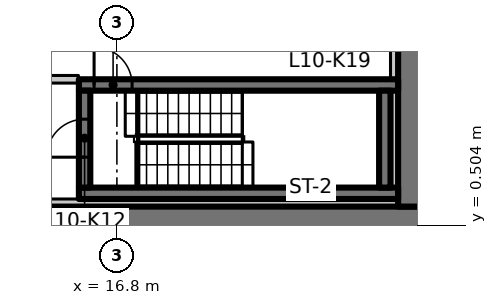
"""IFC4 building model, lengths in metres.
Left out: names, types, materials, properties, quantities, classifications, styles, units other than length and angle.
Written with IfcOpenShell. Run it as: python <this file> out.ifc"""

import sys

from ifc_helpers import new_model, si_unit, direction, frame, frame_2d, origin, place, context, subcontext, project, spatial, rectangle, extrude, element, fill, save


model = new_model("IFC4")
c1 = context("Model", 3, precision=1e-05, world=origin(), true_north=direction((0.0, 1.0)))
c2 = subcontext(c1, "Body", "Model", "MODEL_VIEW")
j1 = project(units=[si_unit("LENGTHUNIT", "METRE"), si_unit("PLANEANGLEUNIT", "RADIAN")], contexts=[c1])
p1 = place(None, origin())
s1 = spatial("IfcSite", under=j1, at=p1, CompositionType="ELEMENT")
p2 = place(p1, origin())
s2 = spatial("IfcBuilding", under=s1, at=p2, CompositionType="ELEMENT")
p3 = place(p2, frame((0.0, 0.0, 50.9)))
s3 = spatial("IfcBuildingStorey", under=s2, at=p3, CompositionType="ELEMENT", Elevation=50.9)
p4 = place(p3, frame((6.936, 0.5, 0.0), z_axis=(0.0, 0.0, 1.0), x_axis=(1.0, 0.0, 0.0)))
e1 = element("IfcWall", 1, at=p4, inside=s3, PredefinedType="SHEAR", context=c2, shape_type="SweptSolid", body=[
    extrude(rectangle(XDim=18.264, YDim=1.0, at=frame_2d((9.132, 0.0))), origin(), (0.0, 0.0, 1.0), 3.35),
])
p5 = place(p3, frame((24.7, 1.0, 0.0), z_axis=(0.0, 0.0, 1.0), x_axis=(0.0, 1.0, 0.0)))
e2 = element("IfcWall", 2, at=p5, inside=s3, PredefinedType="SHEAR", context=c2, shape_type="SweptSolid", body=[
    extrude(rectangle(XDim=8.8, YDim=1.0, at=frame_2d((4.4, 0.0))), origin(), (0.0, 0.0, 1.0), 3.35),
])
p6 = place(p3, frame((15.8, 1.35, 0.0), z_axis=(0.0, 0.0, 1.0), x_axis=(1.0, 0.0, 0.0)))
e3 = element("IfcWall", 3, at=p6, inside=s3, PredefinedType="SHEAR", context=c2, shape_type="SweptSolid", body=[
    extrude(rectangle(XDim=8.4, YDim=0.3, at=frame_2d((4.2, 0.0))), origin(), (0.0, 0.0, 1.0), 3.35),
])
p7 = place(p3, frame((15.8, 4.2, 0.0), z_axis=(0.0, 0.0, 1.0), x_axis=(1.0, 0.0, 0.0)))
e4 = element("IfcWall", 4, at=p7, inside=s3, PredefinedType="SHEAR", context=c2, shape_type="SweptSolid", body=[
    extrude(rectangle(XDim=8.4, YDim=0.3, at=frame_2d((4.2, 0.0))), origin(), (0.0, 0.0, 1.0), 3.35),
])
p8 = place(p7, frame((0.4, 0.0, 0.0)))
e5 = element("IfcOpeningElement", 5, at=p8, cuts=e4, PredefinedType="OPENING", context=c2, shape_type="SweptSolid", body=[
    extrude(rectangle(XDim=1.0, YDim=2.1, at=frame_2d((0.5, 1.05))), frame((0.0, 0.16, 0.0), z_axis=(0.0, -1.0, 0.0), x_axis=(1.0, 0.0, 0.0)), (0.0, 0.0, 1.0), 0.32),
])
p9 = place(p3, frame((15.95, 1.5, 0.0), z_axis=(0.0, 0.0, 1.0), x_axis=(0.0, 1.0, 0.0)))
e6 = element("IfcWall", 6, at=p9, inside=s3, PredefinedType="SHEAR", context=c2, shape_type="SweptSolid", body=[
    extrude(rectangle(XDim=2.55, YDim=0.3, at=frame_2d((1.275, 0.0))), origin(), (0.0, 0.0, 1.0), 3.35),
])
p10 = place(p9, frame((0.8, 0.0, 0.0)))
e7 = element("IfcOpeningElement", 7, at=p10, cuts=e6, PredefinedType="OPENING", context=c2, shape_type="SweptSolid", body=[
    extrude(rectangle(XDim=1.0, YDim=2.1, at=frame_2d((0.5, 1.05))), frame((0.0, 0.16, 0.0), z_axis=(0.0, -1.0, 0.0), x_axis=(1.0, 0.0, 0.0)), (0.0, 0.0, 1.0), 0.32),
])
p11 = place(p3, frame((23.85, 1.5, 0.0), z_axis=(0.0, 0.0, 1.0), x_axis=(0.0, 1.0, 0.0)))
e8 = element("IfcWall", 8, at=p11, inside=s3, PredefinedType="SHEAR", context=c2, shape_type="SweptSolid", body=[
    extrude(rectangle(XDim=2.55, YDim=0.3, at=frame_2d((1.275, 0.0))), origin(), (0.0, 0.0, 1.0), 3.35),
])
p12 = place(p3, frame((13.362, 4.35, 0.0), z_axis=(0.0, 0.0, 1.0), x_axis=(1.0, 0.0, 0.0)))
e9 = element("IfcWall", 9, at=p12, inside=s3, PredefinedType="PARTITIONING", context=c2, shape_type="SweptSolid", body=[
    extrude(rectangle(XDim=2.426, YDim=0.2, at=frame_2d((1.213, 0.0))), origin(), (0.0, 0.0, 1.0), 3.35),
])
p13 = place(p12, frame((0.638, 0.0, 0.0)))
e10 = element("IfcOpeningElement", 10, at=p13, cuts=e9, PredefinedType="OPENING", context=c2, shape_type="SweptSolid", body=[
    extrude(rectangle(XDim=1.0, YDim=2.1, at=frame_2d((0.5, 1.05))), frame((0.0, 0.11, 0.0), z_axis=(0.0, -1.0, 0.0), x_axis=(1.0, 0.0, 0.0)), (0.0, 0.0, 1.0), 0.22),
])
p14 = place(p3, frame((13.35, 1.1, 0.0), z_axis=(0.0, 0.0, 1.0), x_axis=(1.0, 0.0, 0.0)))
e11 = element("IfcWall", 11, at=p14, inside=s3, PredefinedType="PARTITIONING", context=c2, shape_type="SweptSolid", body=[
    extrude(rectangle(XDim=10.85, YDim=0.2, at=frame_2d((5.425, 0.0))), origin(), (0.0, 0.0, 1.0), 3.35),
])
p15 = place(p3, frame((24.1, 1.5, 0.0), z_axis=(0.0, 0.0, 1.0), x_axis=(0.0, 1.0, 0.0)))
e12 = element("IfcWall", 12, at=p15, inside=s3, PredefinedType="PARTITIONING", context=c2, shape_type="SweptSolid", body=[
    extrude(rectangle(XDim=2.55, YDim=0.2, at=frame_2d((1.275, 0.0))), origin(), (0.0, 0.0, 1.0), 3.35),
])
p16 = place(p3, frame((24.1, 4.35, 0.0), z_axis=(0.0, 0.0, 1.0), x_axis=(0.0, 1.0, 0.0)))
e13 = element("IfcWall", 13, at=p16, inside=s3, PredefinedType="PARTITIONING", context=c2, shape_type="SweptSolid", body=[
    extrude(rectangle(XDim=5.45, YDim=0.2, at=frame_2d((2.725, 0.0))), origin(), (0.0, 0.0, 1.0), 3.35),
])
p17 = place(p10, origin())
e14 = element("IfcDoor", 14, at=p17, inside=s3, OperationType="SINGLE_SWING_RIGHT", PredefinedType="DOOR", context=c2, shape_type="SweptSolid", body=[
    extrude(rectangle(XDim=1.0, YDim=2.1, at=frame_2d((0.5, 1.05))), frame((0.0, 0.025, 0.0), z_axis=(0.0, -1.0, 0.0), x_axis=(1.0, 0.0, 0.0)), (0.0, 0.0, 1.0), 0.05),
])
fill(e7, e14)
p18 = place(p8, origin())
e15 = element("IfcDoor", 15, at=p18, inside=s3, OperationType="SINGLE_SWING_LEFT", PredefinedType="DOOR", context=c2, shape_type="SweptSolid", body=[
    extrude(rectangle(XDim=1.0, YDim=2.1, at=frame_2d((0.5, 1.05))), frame((0.0, 0.025, 0.0), z_axis=(0.0, -1.0, 0.0), x_axis=(1.0, 0.0, 0.0)), (0.0, 0.0, 1.0), 0.05),
])
fill(e5, e15)
save(model, sys.argv[1])
